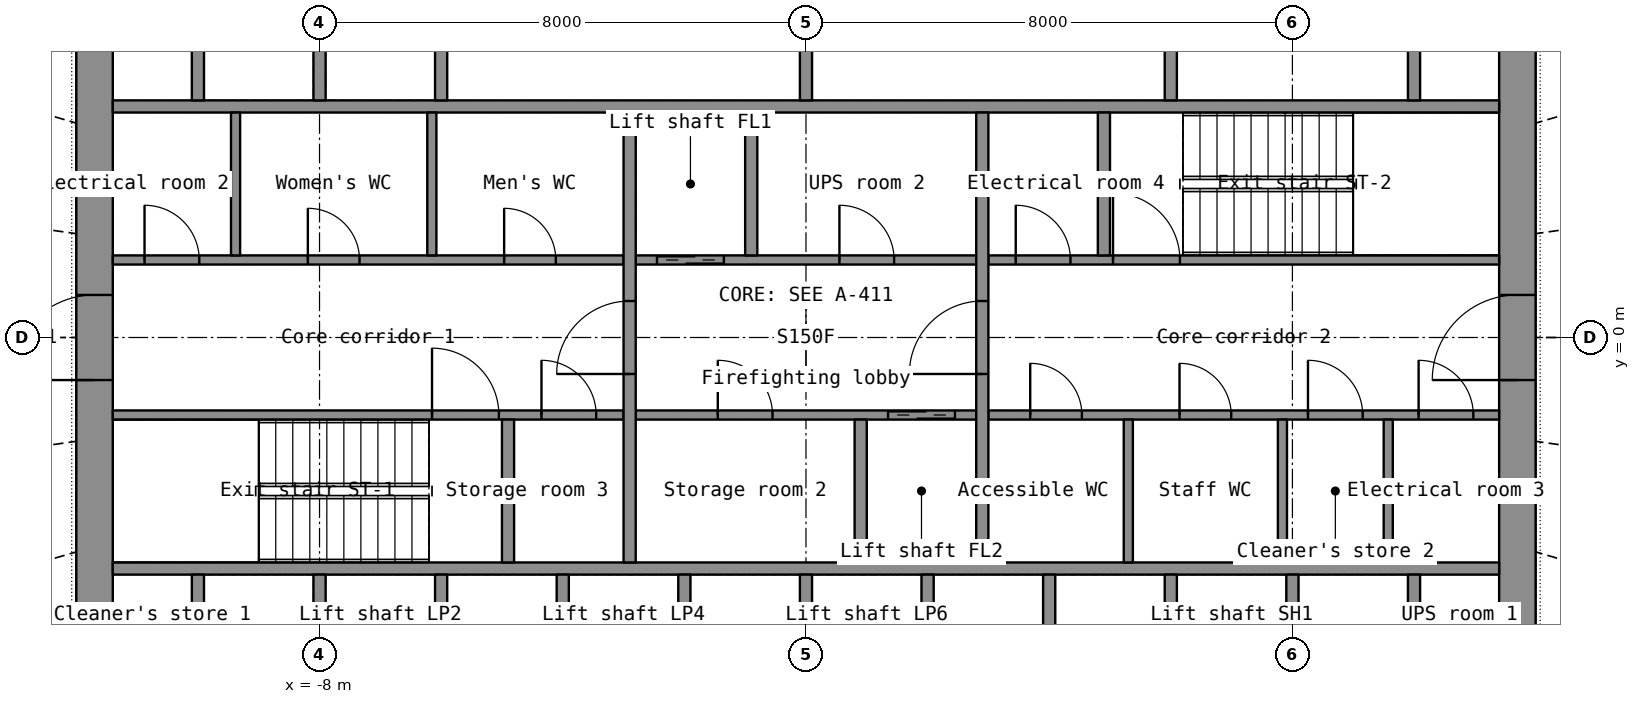
"""IFC4 building model, lengths in metres.
Left out: names, types, materials, properties, quantities, classifications, styles, units other than length and angle.
Written with IfcOpenShell. Run it as: python <this file> out.ifc"""

import sys

from ifc_helpers import new_model, si_unit, direction, frame, frame_2d, origin, place, context, subcontext, project, spatial, rectangle, extrude, element, fill, save


model = new_model("IFC4")
c1 = context("Model", 3, precision=1e-05, world=origin(), true_north=direction((0.0, 1.0)))
c2 = subcontext(c1, "Body", "Model", "MODEL_VIEW")
j1 = project(units=[si_unit("LENGTHUNIT", "METRE"), si_unit("PLANEANGLEUNIT", "RADIAN")], contexts=[c1])
p1 = place(None, origin())
s1 = spatial("IfcSite", under=j1, at=p1, CompositionType="ELEMENT")
p2 = place(p1, origin())
s2 = spatial("IfcBuilding", under=s1, at=p2, CompositionType="ELEMENT")
p3 = place(p2, frame((0.0, 0.0, 70.4)))
s3 = spatial("IfcBuildingStorey", under=s2, at=p3, CompositionType="ELEMENT", Elevation=70.4)
p4 = place(p3, frame((-11.7, -7.2, 0.0), z_axis=(0.0, 0.0, 1.0), x_axis=(0.0, 1.0, 0.0)))
e1 = element("IfcWall", 1, at=p4, inside=s3, PredefinedType="SHEAR", context=c2, shape_type="SweptSolid", body=[
    extrude(rectangle(XDim=14.4, YDim=0.6, at=frame_2d((7.2, 0.0))), origin(), (0.0, 0.0, 1.0), 3.3),
])
p5 = place(p4, frame((6.5, 0.0, 0.0)))
e2 = element("IfcOpeningElement", 2, at=p5, cuts=e1, PredefinedType="OPENING", context=c2, shape_type="SweptSolid", body=[
    extrude(rectangle(XDim=1.4, YDim=2.2, at=frame_2d((0.7, 1.1))), frame((0.0, 0.31, 0.0), z_axis=(0.0, -1.0, 0.0), x_axis=(1.0, 0.0, 0.0)), (0.0, 0.0, 1.0), 0.62),
])
p6 = place(p3, frame((11.7, -7.2, 0.0), z_axis=(0.0, 0.0, 1.0), x_axis=(0.0, 1.0, 0.0)))
e3 = element("IfcWall", 3, at=p6, inside=s3, PredefinedType="SHEAR", context=c2, shape_type="SweptSolid", body=[
    extrude(rectangle(XDim=14.4, YDim=0.6, at=frame_2d((7.2, 0.0))), origin(), (0.0, 0.0, 1.0), 3.3),
])
p7 = place(p6, frame((6.5, 0.0, 0.0)))
e4 = element("IfcOpeningElement", 4, at=p7, cuts=e3, PredefinedType="OPENING", context=c2, shape_type="SweptSolid", body=[
    extrude(rectangle(XDim=1.4, YDim=2.2, at=frame_2d((0.7, 1.1))), frame((0.0, 0.31, 0.0), z_axis=(0.0, -1.0, 0.0), x_axis=(1.0, 0.0, 0.0)), (0.0, 0.0, 1.0), 0.62),
])
for number, where, z_axis, x_axis in (
    (5, (-11.4, -3.8, 0.0), (0.0, 0.0, 1.0), (1.0, 0.0, 0.0)),
    (6, (-11.4, 3.8, 0.0), (0.0, 0.0, 1.0), (1.0, 0.0, 0.0)),
):
    element("IfcWall", number, at=place(p3, frame(where, z_axis=z_axis, x_axis=x_axis)), inside=s3, PredefinedType="SHEAR", context=c2, shape_type="SweptSolid", body=[
        extrude(rectangle(XDim=22.8, YDim=0.2, at=frame_2d((11.4, 0.0))), origin(), (0.0, 0.0, 1.0), 3.3),
    ])
for number, where, z_axis, x_axis in (
    (7, (-10.0, -6.6, 0.0), (0.0, 0.0, 1.0), (0.0, 1.0, 0.0)),
    (8, (-8.0, -6.6, 0.0), (0.0, 0.0, 1.0), (0.0, 1.0, 0.0)),
    (9, (-6.0, -6.6, 0.0), (0.0, 0.0, 1.0), (0.0, 1.0, 0.0)),
    (10, (-4.0, -6.6, 0.0), (0.0, 0.0, 1.0), (0.0, 1.0, 0.0)),
    (11, (-2.0, -6.6, 0.0), (0.0, 0.0, 1.0), (0.0, 1.0, 0.0)),
    (12, (0.0, -6.6, 0.0), (0.0, 0.0, 1.0), (0.0, 1.0, 0.0)),
    (13, (2.0, -6.6, 0.0), (0.0, 0.0, 1.0), (0.0, 1.0, 0.0)),
    (14, (4.0, -6.6, 0.0), (0.0, 0.0, 1.0), (0.0, 1.0, 0.0)),
    (15, (6.0, -6.6, 0.0), (0.0, 0.0, 1.0), (0.0, 1.0, 0.0)),
    (16, (8.0, -6.6, 0.0), (0.0, 0.0, 1.0), (0.0, 1.0, 0.0)),
    (17, (10.0, -6.6, 0.0), (0.0, 0.0, 1.0), (0.0, 1.0, 0.0)),
    (18, (-10.0, 3.9, 0.0), (0.0, 0.0, 1.0), (0.0, 1.0, 0.0)),
    (19, (-8.0, 3.9, 0.0), (0.0, 0.0, 1.0), (0.0, 1.0, 0.0)),
    (20, (-6.0, 3.9, 0.0), (0.0, 0.0, 1.0), (0.0, 1.0, 0.0)),
    (21, (10.0, 3.9, 0.0), (0.0, 0.0, 1.0), (0.0, 1.0, 0.0)),
):
    element("IfcWall", number, at=place(p3, frame(where, z_axis=z_axis, x_axis=x_axis)), inside=s3, PredefinedType="SHEAR", context=c2, shape_type="SweptSolid", body=[
        extrude(rectangle(XDim=2.7, YDim=0.2, at=frame_2d((1.35, 0.0))), origin(), (0.0, 0.0, 1.0), 3.3),
    ])
for number, where, z_axis, x_axis in (
    (22, (0.0, 3.9, 0.0), (0.0, 0.0, 1.0), (0.0, 1.0, 0.0)),
    (23, (6.0, 3.9, 0.0), (0.0, 0.0, 1.0), (0.0, 1.0, 0.0)),
):
    element("IfcWall", number, at=place(p3, frame(where, z_axis=z_axis, x_axis=x_axis)), inside=s3, PredefinedType="PARTITIONING", context=c2, shape_type="SweptSolid", body=[
        extrude(rectangle(XDim=2.7, YDim=0.2, at=frame_2d((1.35, 0.0))), origin(), (0.0, 0.0, 1.0), 3.3),
    ])
p8 = place(p3, frame((-11.4, -1.275, 0.0), z_axis=(0.0, 0.0, 1.0), x_axis=(1.0, 0.0, 0.0)))
e24 = element("IfcWall", 24, at=p8, inside=s3, PredefinedType="SHEAR", context=c2, shape_type="SweptSolid", body=[
    extrude(rectangle(XDim=8.4, YDim=0.15, at=frame_2d((4.2, 0.0))), origin(), (0.0, 0.0, 1.0), 3.3),
])
p9 = place(p8, frame((5.25, 0.0, 0.0)))
e25 = element("IfcOpeningElement", 25, at=p9, cuts=e24, PredefinedType="OPENING", context=c2, shape_type="SweptSolid", body=[
    extrude(rectangle(XDim=1.1, YDim=2.15, at=frame_2d((0.55, 1.075))), frame((0.0, 0.085, 0.0), z_axis=(0.0, -1.0, 0.0), x_axis=(1.0, 0.0, 0.0)), (0.0, 0.0, 1.0), 0.17),
])
p10 = place(p8, frame((7.05, 0.0, 0.0)))
e26 = element("IfcOpeningElement", 26, at=p10, cuts=e24, PredefinedType="OPENING", context=c2, shape_type="SweptSolid", body=[
    extrude(rectangle(XDim=0.9, YDim=2.1, at=frame_2d((0.45, 1.05))), frame((0.0, 0.085, 0.0), z_axis=(0.0, -1.0, 0.0), x_axis=(1.0, 0.0, 0.0)), (0.0, 0.0, 1.0), 0.17),
])
p11 = place(p3, frame((-2.8, -1.275, 0.0), z_axis=(0.0, 0.0, 1.0), x_axis=(1.0, 0.0, 0.0)))
e27 = element("IfcWall", 27, at=p11, inside=s3, PredefinedType="SHEAR", context=c2, shape_type="SweptSolid", body=[
    extrude(rectangle(XDim=5.6, YDim=0.15, at=frame_2d((2.8, 0.0))), origin(), (0.0, 0.0, 1.0), 3.3),
])
p12 = place(p11, frame((4.15, 0.0, 0.0)))
e28 = element("IfcOpeningElement", 28, at=p12, cuts=e27, PredefinedType="OPENING", context=c2, shape_type="SweptSolid", body=[
    extrude(rectangle(XDim=1.1, YDim=2.2, at=frame_2d((0.55, 1.1))), frame((0.0, 0.085, 0.0), z_axis=(0.0, -1.0, 0.0), x_axis=(1.0, 0.0, 0.0)), (0.0, 0.0, 1.0), 0.17),
])
p13 = place(p11, frame((1.35, 0.0, 0.0)))
e29 = element("IfcOpeningElement", 29, at=p13, cuts=e27, PredefinedType="OPENING", context=c2, shape_type="SweptSolid", body=[
    extrude(rectangle(XDim=0.9, YDim=2.1, at=frame_2d((0.45, 1.05))), frame((0.0, 0.085, 0.0), z_axis=(0.0, -1.0, 0.0), x_axis=(1.0, 0.0, 0.0)), (0.0, 0.0, 1.0), 0.17),
])
p14 = place(p3, frame((3.0, -1.275, 0.0), z_axis=(0.0, 0.0, 1.0), x_axis=(1.0, 0.0, 0.0)))
e30 = element("IfcWall", 30, at=p14, inside=s3, PredefinedType="PARTITIONING", context=c2, shape_type="SweptSolid", body=[
    extrude(rectangle(XDim=8.4, YDim=0.15, at=frame_2d((4.2, 0.0))), origin(), (0.0, 0.0, 1.0), 3.3),
])
p15 = place(p14, frame((0.688, 0.0, 0.0)))
e31 = element("IfcOpeningElement", 31, at=p15, cuts=e30, PredefinedType="OPENING", context=c2, shape_type="SweptSolid", body=[
    extrude(rectangle(XDim=0.85, YDim=2.1, at=frame_2d((0.425, 1.05))), frame((0.0, 0.085, 0.0), z_axis=(0.0, -1.0, 0.0), x_axis=(1.0, 0.0, 0.0)), (0.0, 0.0, 1.0), 0.17),
])
p16 = place(p14, frame((3.144, 0.0, 0.0)))
e32 = element("IfcOpeningElement", 32, at=p16, cuts=e30, PredefinedType="OPENING", context=c2, shape_type="SweptSolid", body=[
    extrude(rectangle(XDim=0.85, YDim=2.1, at=frame_2d((0.425, 1.05))), frame((0.0, 0.085, 0.0), z_axis=(0.0, -1.0, 0.0), x_axis=(1.0, 0.0, 0.0)), (0.0, 0.0, 1.0), 0.17),
])
p17 = place(p14, frame((5.256, 0.0, 0.0)))
e33 = element("IfcOpeningElement", 33, at=p17, cuts=e30, PredefinedType="OPENING", context=c2, shape_type="SweptSolid", body=[
    extrude(rectangle(XDim=0.9, YDim=2.1, at=frame_2d((0.45, 1.05))), frame((0.0, 0.085, 0.0), z_axis=(0.0, -1.0, 0.0), x_axis=(1.0, 0.0, 0.0)), (0.0, 0.0, 1.0), 0.17),
])
p18 = place(p14, frame((7.075, 0.0, 0.0)))
e34 = element("IfcOpeningElement", 34, at=p18, cuts=e30, PredefinedType="OPENING", context=c2, shape_type="SweptSolid", body=[
    extrude(rectangle(XDim=0.9, YDim=2.1, at=frame_2d((0.45, 1.05))), frame((0.0, 0.085, 0.0), z_axis=(0.0, -1.0, 0.0), x_axis=(1.0, 0.0, 0.0)), (0.0, 0.0, 1.0), 0.17),
])
p19 = place(p3, frame((-11.4, 1.275, 0.0), z_axis=(0.0, 0.0, 1.0), x_axis=(1.0, 0.0, 0.0)))
e35 = element("IfcWall", 35, at=p19, inside=s3, PredefinedType="PARTITIONING", context=c2, shape_type="SweptSolid", body=[
    extrude(rectangle(XDim=8.4, YDim=0.15, at=frame_2d((4.2, 0.0))), origin(), (0.0, 0.0, 1.0), 3.3),
])
p20 = place(p19, frame((0.522, 0.0, 0.0)))
e36 = element("IfcOpeningElement", 36, at=p20, cuts=e35, PredefinedType="OPENING", context=c2, shape_type="SweptSolid", body=[
    extrude(rectangle(XDim=0.9, YDim=2.1, at=frame_2d((0.45, 1.05))), frame((0.0, 0.085, 0.0), z_axis=(0.0, -1.0, 0.0), x_axis=(1.0, 0.0, 0.0)), (0.0, 0.0, 1.0), 0.17),
])
p21 = place(p19, frame((3.208, 0.0, 0.0)))
e37 = element("IfcOpeningElement", 37, at=p21, cuts=e35, PredefinedType="OPENING", context=c2, shape_type="SweptSolid", body=[
    extrude(rectangle(XDim=0.85, YDim=2.1, at=frame_2d((0.425, 1.05))), frame((0.0, 0.085, 0.0), z_axis=(0.0, -1.0, 0.0), x_axis=(1.0, 0.0, 0.0)), (0.0, 0.0, 1.0), 0.17),
])
p22 = place(p19, frame((6.436, 0.0, 0.0)))
e38 = element("IfcOpeningElement", 38, at=p22, cuts=e35, PredefinedType="OPENING", context=c2, shape_type="SweptSolid", body=[
    extrude(rectangle(XDim=0.85, YDim=2.1, at=frame_2d((0.425, 1.05))), frame((0.0, 0.085, 0.0), z_axis=(0.0, -1.0, 0.0), x_axis=(1.0, 0.0, 0.0)), (0.0, 0.0, 1.0), 0.17),
])
p23 = place(p3, frame((-2.8, 1.275, 0.0), z_axis=(0.0, 0.0, 1.0), x_axis=(1.0, 0.0, 0.0)))
e39 = element("IfcWall", 39, at=p23, inside=s3, PredefinedType="SHEAR", context=c2, shape_type="SweptSolid", body=[
    extrude(rectangle(XDim=5.6, YDim=0.15, at=frame_2d((2.8, 0.0))), origin(), (0.0, 0.0, 1.0), 3.3),
])
p24 = place(p23, frame((0.35, 0.0, 0.0)))
e40 = element("IfcOpeningElement", 40, at=p24, cuts=e39, PredefinedType="OPENING", context=c2, shape_type="SweptSolid", body=[
    extrude(rectangle(XDim=1.1, YDim=2.2, at=frame_2d((0.55, 1.1))), frame((0.0, 0.085, 0.0), z_axis=(0.0, -1.0, 0.0), x_axis=(1.0, 0.0, 0.0)), (0.0, 0.0, 1.0), 0.17),
])
p25 = place(p23, frame((3.35, 0.0, 0.0)))
e41 = element("IfcOpeningElement", 41, at=p25, cuts=e39, PredefinedType="OPENING", context=c2, shape_type="SweptSolid", body=[
    extrude(rectangle(XDim=0.9, YDim=2.1, at=frame_2d((0.45, 1.05))), frame((0.0, 0.085, 0.0), z_axis=(0.0, -1.0, 0.0), x_axis=(1.0, 0.0, 0.0)), (0.0, 0.0, 1.0), 0.17),
])
p26 = place(p3, frame((3.0, 1.275, 0.0), z_axis=(0.0, 0.0, 1.0), x_axis=(1.0, 0.0, 0.0)))
e42 = element("IfcWall", 42, at=p26, inside=s3, PredefinedType="SHEAR", context=c2, shape_type="SweptSolid", body=[
    extrude(rectangle(XDim=8.4, YDim=0.15, at=frame_2d((4.2, 0.0))), origin(), (0.0, 0.0, 1.0), 3.3),
])
p27 = place(p26, frame((2.05, 0.0, 0.0)))
e43 = element("IfcOpeningElement", 43, at=p27, cuts=e42, PredefinedType="OPENING", context=c2, shape_type="SweptSolid", body=[
    extrude(rectangle(XDim=1.1, YDim=2.15, at=frame_2d((0.55, 1.075))), frame((0.0, 0.085, 0.0), z_axis=(0.0, -1.0, 0.0), x_axis=(1.0, 0.0, 0.0)), (0.0, 0.0, 1.0), 0.17),
])
p28 = place(p26, frame((0.45, 0.0, 0.0)))
e44 = element("IfcOpeningElement", 44, at=p28, cuts=e42, PredefinedType="OPENING", context=c2, shape_type="SweptSolid", body=[
    extrude(rectangle(XDim=0.9, YDim=2.1, at=frame_2d((0.45, 1.05))), frame((0.0, 0.085, 0.0), z_axis=(0.0, -1.0, 0.0), x_axis=(1.0, 0.0, 0.0)), (0.0, 0.0, 1.0), 0.17),
])
p29 = place(p3, frame((-2.9, -3.7, 0.0), z_axis=(0.0, 0.0, 1.0), x_axis=(0.0, 1.0, 0.0)))
e45 = element("IfcWall", 45, at=p29, inside=s3, PredefinedType="SHEAR", context=c2, shape_type="SweptSolid", body=[
    extrude(rectangle(XDim=7.4, YDim=0.2, at=frame_2d((3.7, 0.0))), origin(), (0.0, 0.0, 1.0), 3.3),
])
p30 = place(p29, frame((3.1, 0.0, 0.0)))
e46 = element("IfcOpeningElement", 46, at=p30, cuts=e45, PredefinedType="OPENING", context=c2, shape_type="SweptSolid", body=[
    extrude(rectangle(XDim=1.2, YDim=2.2, at=frame_2d((0.6, 1.1))), frame((0.0, 0.11, 0.0), z_axis=(0.0, -1.0, 0.0), x_axis=(1.0, 0.0, 0.0)), (0.0, 0.0, 1.0), 0.22),
])
p31 = place(p3, frame((2.9, -3.7, 0.0), z_axis=(0.0, 0.0, 1.0), x_axis=(0.0, 1.0, 0.0)))
e47 = element("IfcWall", 47, at=p31, inside=s3, PredefinedType="SHEAR", context=c2, shape_type="SweptSolid", body=[
    extrude(rectangle(XDim=7.4, YDim=0.2, at=frame_2d((3.7, 0.0))), origin(), (0.0, 0.0, 1.0), 3.3),
])
p32 = place(p31, frame((3.1, 0.0, 0.0)))
e48 = element("IfcOpeningElement", 48, at=p32, cuts=e47, PredefinedType="OPENING", context=c2, shape_type="SweptSolid", body=[
    extrude(rectangle(XDim=1.2, YDim=2.2, at=frame_2d((0.6, 1.1))), frame((0.0, 0.11, 0.0), z_axis=(0.0, -1.0, 0.0), x_axis=(1.0, 0.0, 0.0)), (0.0, 0.0, 1.0), 0.22),
])
for number, where, z_axis, x_axis in (
    (49, (-0.9, 1.35, 0.0), (0.0, 0.0, 1.0), (0.0, 1.0, 0.0)),
    (50, (0.9, -3.7, 0.0), (0.0, 0.0, 1.0), (0.0, 1.0, 0.0)),
    (51, (-4.9, -3.7, 0.0), (0.0, 0.0, 1.0), (0.0, 1.0, 0.0)),
    (52, (4.9, 1.35, 0.0), (0.0, 0.0, 1.0), (0.0, 1.0, 0.0)),
):
    element("IfcWall", number, at=place(p3, frame(where, z_axis=z_axis, x_axis=x_axis)), inside=s3, PredefinedType="SHEAR", context=c2, shape_type="SweptSolid", body=[
        extrude(rectangle(XDim=2.35, YDim=0.2, at=frame_2d((1.175, 0.0))), origin(), (0.0, 0.0, 1.0), 3.3),
    ])
for number, where, z_axis, x_axis in (
    (53, (-9.381, 1.35, 0.0), (0.0, 0.0, 1.0), (0.0, 1.0, 0.0)),
    (54, (-6.153, 1.35, 0.0), (0.0, 0.0, 1.0), (0.0, 1.0, 0.0)),
    (55, (5.301, -3.7, 0.0), (0.0, 0.0, 1.0), (0.0, 1.0, 0.0)),
    (56, (7.836, -3.7, 0.0), (0.0, 0.0, 1.0), (0.0, 1.0, 0.0)),
    (57, (9.576, -3.7, 0.0), (0.0, 0.0, 1.0), (0.0, 1.0, 0.0)),
):
    element("IfcWall", number, at=place(p3, frame(where, z_axis=z_axis, x_axis=x_axis)), inside=s3, PredefinedType="PARTITIONING", context=c2, shape_type="SweptSolid", body=[
        extrude(rectangle(XDim=2.35, YDim=0.15, at=frame_2d((1.175, 0.0))), origin(), (0.0, 0.0, 1.0), 3.3),
    ])
p33 = place(p5, origin())
e58 = element("IfcDoor", 58, at=p33, inside=s3, OperationType="DOUBLE_DOOR_SINGLE_SWING", PredefinedType="DOOR", context=c2, shape_type="SweptSolid", body=[
    extrude(rectangle(XDim=1.4, YDim=2.2, at=frame_2d((0.7, 1.1))), frame((0.0, 0.025, 0.0), z_axis=(0.0, -1.0, 0.0), x_axis=(1.0, 0.0, 0.0)), (0.0, 0.0, 1.0), 0.05),
])
fill(e2, e58)
p34 = place(p7, origin())
e59 = element("IfcDoor", 59, at=p34, inside=s3, OperationType="DOUBLE_DOOR_SINGLE_SWING", PredefinedType="DOOR", context=c2, shape_type="SweptSolid", body=[
    extrude(rectangle(XDim=1.4, YDim=2.2, at=frame_2d((0.7, 1.1))), frame((0.0, 0.025, 0.0), z_axis=(0.0, -1.0, 0.0), x_axis=(1.0, 0.0, 0.0)), (0.0, 0.0, 1.0), 0.05),
])
fill(e4, e59)
p35 = place(p30, origin())
e60 = element("IfcDoor", 60, at=p35, inside=s3, OperationType="SINGLE_SWING_LEFT", PredefinedType="DOOR", context=c2, shape_type="SweptSolid", body=[
    extrude(rectangle(XDim=1.2, YDim=2.2, at=frame_2d((0.6, 1.1))), frame((0.0, 0.025, 0.0), z_axis=(0.0, -1.0, 0.0), x_axis=(1.0, 0.0, 0.0)), (0.0, 0.0, 1.0), 0.05),
])
fill(e46, e60)
p36 = place(p32, origin())
e61 = element("IfcDoor", 61, at=p36, inside=s3, OperationType="SINGLE_SWING_LEFT", PredefinedType="DOOR", context=c2, shape_type="SweptSolid", body=[
    extrude(rectangle(XDim=1.2, YDim=2.2, at=frame_2d((0.6, 1.1))), frame((0.0, 0.025, 0.0), z_axis=(0.0, -1.0, 0.0), x_axis=(1.0, 0.0, 0.0)), (0.0, 0.0, 1.0), 0.05),
])
fill(e48, e61)
p37 = place(p24, origin())
e62 = element("IfcDoor", 62, at=p37, inside=s3, OperationType="DOUBLE_DOOR_SLIDING", PredefinedType="DOOR", context=c2, shape_type="SweptSolid", body=[
    extrude(rectangle(XDim=1.1, YDim=2.2, at=frame_2d((0.55, 1.1))), frame((0.0, 0.025, 0.0), z_axis=(0.0, -1.0, 0.0), x_axis=(1.0, 0.0, 0.0)), (0.0, 0.0, 1.0), 0.05),
])
fill(e40, e62)
p38 = place(p12, origin())
e63 = element("IfcDoor", 63, at=p38, inside=s3, OperationType="DOUBLE_DOOR_SLIDING", PredefinedType="DOOR", context=c2, shape_type="SweptSolid", body=[
    extrude(rectangle(XDim=1.1, YDim=2.2, at=frame_2d((0.55, 1.1))), frame((0.0, 0.025, 0.0), z_axis=(0.0, -1.0, 0.0), x_axis=(1.0, 0.0, 0.0)), (0.0, 0.0, 1.0), 0.05),
])
fill(e28, e63)
p39 = place(p9, origin())
e64 = element("IfcDoor", 64, at=p39, inside=s3, OperationType="SINGLE_SWING_LEFT", PredefinedType="DOOR", context=c2, shape_type="SweptSolid", body=[
    extrude(rectangle(XDim=1.1, YDim=2.15, at=frame_2d((0.55, 1.075))), frame((0.0, 0.025, 0.0), z_axis=(0.0, -1.0, 0.0), x_axis=(1.0, 0.0, 0.0)), (0.0, 0.0, 1.0), 0.05),
])
fill(e25, e64)
p40 = place(p27, origin())
e65 = element("IfcDoor", 65, at=p40, inside=s3, OperationType="SINGLE_SWING_LEFT", PredefinedType="DOOR", context=c2, shape_type="SweptSolid", body=[
    extrude(rectangle(XDim=1.1, YDim=2.15, at=frame_2d((0.55, 1.075))), frame((0.0, 0.025, 0.0), z_axis=(0.0, -1.0, 0.0), x_axis=(1.0, 0.0, 0.0)), (0.0, 0.0, 1.0), 0.05),
])
fill(e43, e65)
p41 = place(p20, origin())
e66 = element("IfcDoor", 66, at=p41, inside=s3, OperationType="SINGLE_SWING_LEFT", PredefinedType="DOOR", context=c2, shape_type="SweptSolid", body=[
    extrude(rectangle(XDim=0.9, YDim=2.1, at=frame_2d((0.45, 1.05))), frame((0.0, 0.025, 0.0), z_axis=(0.0, -1.0, 0.0), x_axis=(1.0, 0.0, 0.0)), (0.0, 0.0, 1.0), 0.05),
])
fill(e36, e66)
p42 = place(p21, origin())
e67 = element("IfcDoor", 67, at=p42, inside=s3, OperationType="SINGLE_SWING_LEFT", PredefinedType="DOOR", context=c2, shape_type="SweptSolid", body=[
    extrude(rectangle(XDim=0.85, YDim=2.1, at=frame_2d((0.425, 1.05))), frame((0.0, 0.025, 0.0), z_axis=(0.0, -1.0, 0.0), x_axis=(1.0, 0.0, 0.0)), (0.0, 0.0, 1.0), 0.05),
])
fill(e37, e67)
p43 = place(p22, origin())
e68 = element("IfcDoor", 68, at=p43, inside=s3, OperationType="SINGLE_SWING_LEFT", PredefinedType="DOOR", context=c2, shape_type="SweptSolid", body=[
    extrude(rectangle(XDim=0.85, YDim=2.1, at=frame_2d((0.425, 1.05))), frame((0.0, 0.025, 0.0), z_axis=(0.0, -1.0, 0.0), x_axis=(1.0, 0.0, 0.0)), (0.0, 0.0, 1.0), 0.05),
])
fill(e38, e68)
p44 = place(p15, origin())
e69 = element("IfcDoor", 69, at=p44, inside=s3, OperationType="SINGLE_SWING_LEFT", PredefinedType="DOOR", context=c2, shape_type="SweptSolid", body=[
    extrude(rectangle(XDim=0.85, YDim=2.1, at=frame_2d((0.425, 1.05))), frame((0.0, 0.025, 0.0), z_axis=(0.0, -1.0, 0.0), x_axis=(1.0, 0.0, 0.0)), (0.0, 0.0, 1.0), 0.05),
])
fill(e31, e69)
p45 = place(p16, origin())
e70 = element("IfcDoor", 70, at=p45, inside=s3, OperationType="SINGLE_SWING_LEFT", PredefinedType="DOOR", context=c2, shape_type="SweptSolid", body=[
    extrude(rectangle(XDim=0.85, YDim=2.1, at=frame_2d((0.425, 1.05))), frame((0.0, 0.025, 0.0), z_axis=(0.0, -1.0, 0.0), x_axis=(1.0, 0.0, 0.0)), (0.0, 0.0, 1.0), 0.05),
])
fill(e32, e70)
p46 = place(p17, origin())
e71 = element("IfcDoor", 71, at=p46, inside=s3, OperationType="SINGLE_SWING_LEFT", PredefinedType="DOOR", context=c2, shape_type="SweptSolid", body=[
    extrude(rectangle(XDim=0.9, YDim=2.1, at=frame_2d((0.45, 1.05))), frame((0.0, 0.025, 0.0), z_axis=(0.0, -1.0, 0.0), x_axis=(1.0, 0.0, 0.0)), (0.0, 0.0, 1.0), 0.05),
])
fill(e33, e71)
p47 = place(p18, origin())
e72 = element("IfcDoor", 72, at=p47, inside=s3, OperationType="SINGLE_SWING_LEFT", PredefinedType="DOOR", context=c2, shape_type="SweptSolid", body=[
    extrude(rectangle(XDim=0.9, YDim=2.1, at=frame_2d((0.45, 1.05))), frame((0.0, 0.025, 0.0), z_axis=(0.0, -1.0, 0.0), x_axis=(1.0, 0.0, 0.0)), (0.0, 0.0, 1.0), 0.05),
])
fill(e34, e72)
p48 = place(p25, origin())
e73 = element("IfcDoor", 73, at=p48, inside=s3, OperationType="SINGLE_SWING_LEFT", PredefinedType="DOOR", context=c2, shape_type="SweptSolid", body=[
    extrude(rectangle(XDim=0.9, YDim=2.1, at=frame_2d((0.45, 1.05))), frame((0.0, 0.025, 0.0), z_axis=(0.0, -1.0, 0.0), x_axis=(1.0, 0.0, 0.0)), (0.0, 0.0, 1.0), 0.05),
])
fill(e41, e73)
p49 = place(p13, origin())
e74 = element("IfcDoor", 74, at=p49, inside=s3, OperationType="SINGLE_SWING_LEFT", PredefinedType="DOOR", context=c2, shape_type="SweptSolid", body=[
    extrude(rectangle(XDim=0.9, YDim=2.1, at=frame_2d((0.45, 1.05))), frame((0.0, 0.025, 0.0), z_axis=(0.0, -1.0, 0.0), x_axis=(1.0, 0.0, 0.0)), (0.0, 0.0, 1.0), 0.05),
])
fill(e29, e74)
p50 = place(p28, origin())
e75 = element("IfcDoor", 75, at=p50, inside=s3, OperationType="SINGLE_SWING_LEFT", PredefinedType="DOOR", context=c2, shape_type="SweptSolid", body=[
    extrude(rectangle(XDim=0.9, YDim=2.1, at=frame_2d((0.45, 1.05))), frame((0.0, 0.025, 0.0), z_axis=(0.0, -1.0, 0.0), x_axis=(1.0, 0.0, 0.0)), (0.0, 0.0, 1.0), 0.05),
])
fill(e44, e75)
p51 = place(p10, origin())
e76 = element("IfcDoor", 76, at=p51, inside=s3, OperationType="SINGLE_SWING_LEFT", PredefinedType="DOOR", context=c2, shape_type="SweptSolid", body=[
    extrude(rectangle(XDim=0.9, YDim=2.1, at=frame_2d((0.45, 1.05))), frame((0.0, 0.025, 0.0), z_axis=(0.0, -1.0, 0.0), x_axis=(1.0, 0.0, 0.0)), (0.0, 0.0, 1.0), 0.05),
])
fill(e26, e76)
save(model, sys.argv[1])
